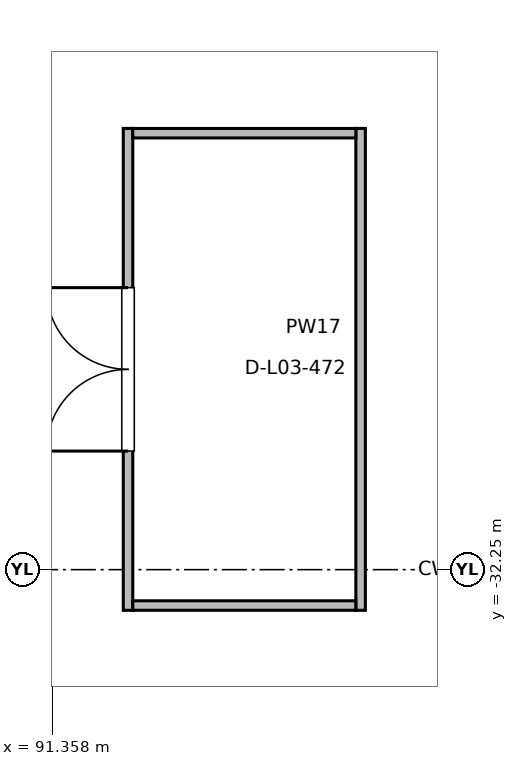
"""IFC4 building model, lengths in metres.
Left out: names, types, materials, properties, quantities, classifications, styles, units other than length and angle.
Written with IfcOpenShell. Run it as: python <this file> out.ifc"""

import sys

from ifc_helpers import new_model, si_unit, direction, frame, frame_2d, origin, place, context, subcontext, project, spatial, rectangle, extrude, element, fill, save


model = new_model("IFC4")
c1 = context("Model", 3, precision=1e-05, world=origin(), true_north=direction((0.0, 1.0)))
c2 = subcontext(c1, "Body", "Model", "MODEL_VIEW")
j1 = project(units=[si_unit("LENGTHUNIT", "METRE"), si_unit("PLANEANGLEUNIT", "RADIAN")], contexts=[c1])
p1 = place(None, origin())
s1 = spatial("IfcSite", under=j1, at=p1, CompositionType="ELEMENT")
p2 = place(p1, origin())
s2 = spatial("IfcBuilding", under=s1, at=p2, CompositionType="ELEMENT")
p3 = place(p2, frame((0.0, 0.0, 11.4)))
s3 = spatial("IfcBuildingStorey", under=s2, at=p3, CompositionType="ELEMENT", Elevation=11.4)
p4 = place(p3, frame((92.354, -32.785, 0.0), z_axis=(0.0, 0.0, 1.0), x_axis=(0.0, 1.0, 0.0)))
e1 = element("IfcWall", 1, at=p4, inside=s3, PredefinedType="PARTITIONING", context=c2, shape_type="SweptSolid", body=[
    extrude(rectangle(XDim=6.34, YDim=0.125, at=frame_2d((3.17, 0.0))), origin(), (0.0, 0.0, 1.0), 3.82),
])
p5 = place(p4, frame((2.095, 0.0, 0.0)))
e2 = element("IfcOpeningElement", 2, at=p5, cuts=e1, PredefinedType="OPENING", context=c2, shape_type="SweptSolid", body=[
    extrude(rectangle(XDim=2.15, YDim=2.45, at=frame_2d((1.075, 1.225))), frame((0.0, 0.073, 0.0), z_axis=(0.0, -1.0, 0.0), x_axis=(1.0, 0.0, 0.0)), (0.0, 0.0, 1.0), 0.145),
])
p6 = place(p3, frame((95.414, -32.785, 0.0), z_axis=(0.0, 0.0, 1.0), x_axis=(0.0, 1.0, 0.0)))
e3 = element("IfcWall", 3, at=p6, inside=s3, PredefinedType="PARTITIONING", context=c2, shape_type="SweptSolid", body=[
    extrude(rectangle(XDim=6.34, YDim=0.125, at=frame_2d((3.17, 0.0))), origin(), (0.0, 0.0, 1.0), 3.82),
])
for number, where, z_axis, x_axis in (
    (4, (92.417, -32.722, 0.0), (0.0, 0.0, 1.0), (1.0, 0.0, 0.0)),
    (5, (92.417, -26.508, 0.0), (0.0, 0.0, 1.0), (1.0, 0.0, 0.0)),
):
    element("IfcWall", number, at=place(p3, frame(where, z_axis=z_axis, x_axis=x_axis)), inside=s3, PredefinedType="PARTITIONING", context=c2, shape_type="SweptSolid", body=[
        extrude(rectangle(XDim=2.934, YDim=0.125, at=frame_2d((1.467, 0.0))), origin(), (0.0, 0.0, 1.0), 3.82),
    ])
p7 = place(p5, origin())
e6 = element("IfcDoor", 6, at=p7, inside=s3, OperationType="DOUBLE_DOOR_SINGLE_SWING", PredefinedType="DOOR", context=c2, shape_type="SweptSolid", body=[
    extrude(rectangle(XDim=2.15, YDim=2.45, at=frame_2d((1.075, 1.225))), frame((0.0, 0.025, 0.0), z_axis=(0.0, -1.0, 0.0), x_axis=(1.0, 0.0, 0.0)), (0.0, 0.0, 1.0), 0.05),
])
fill(e2, e6)
save(model, sys.argv[1])
